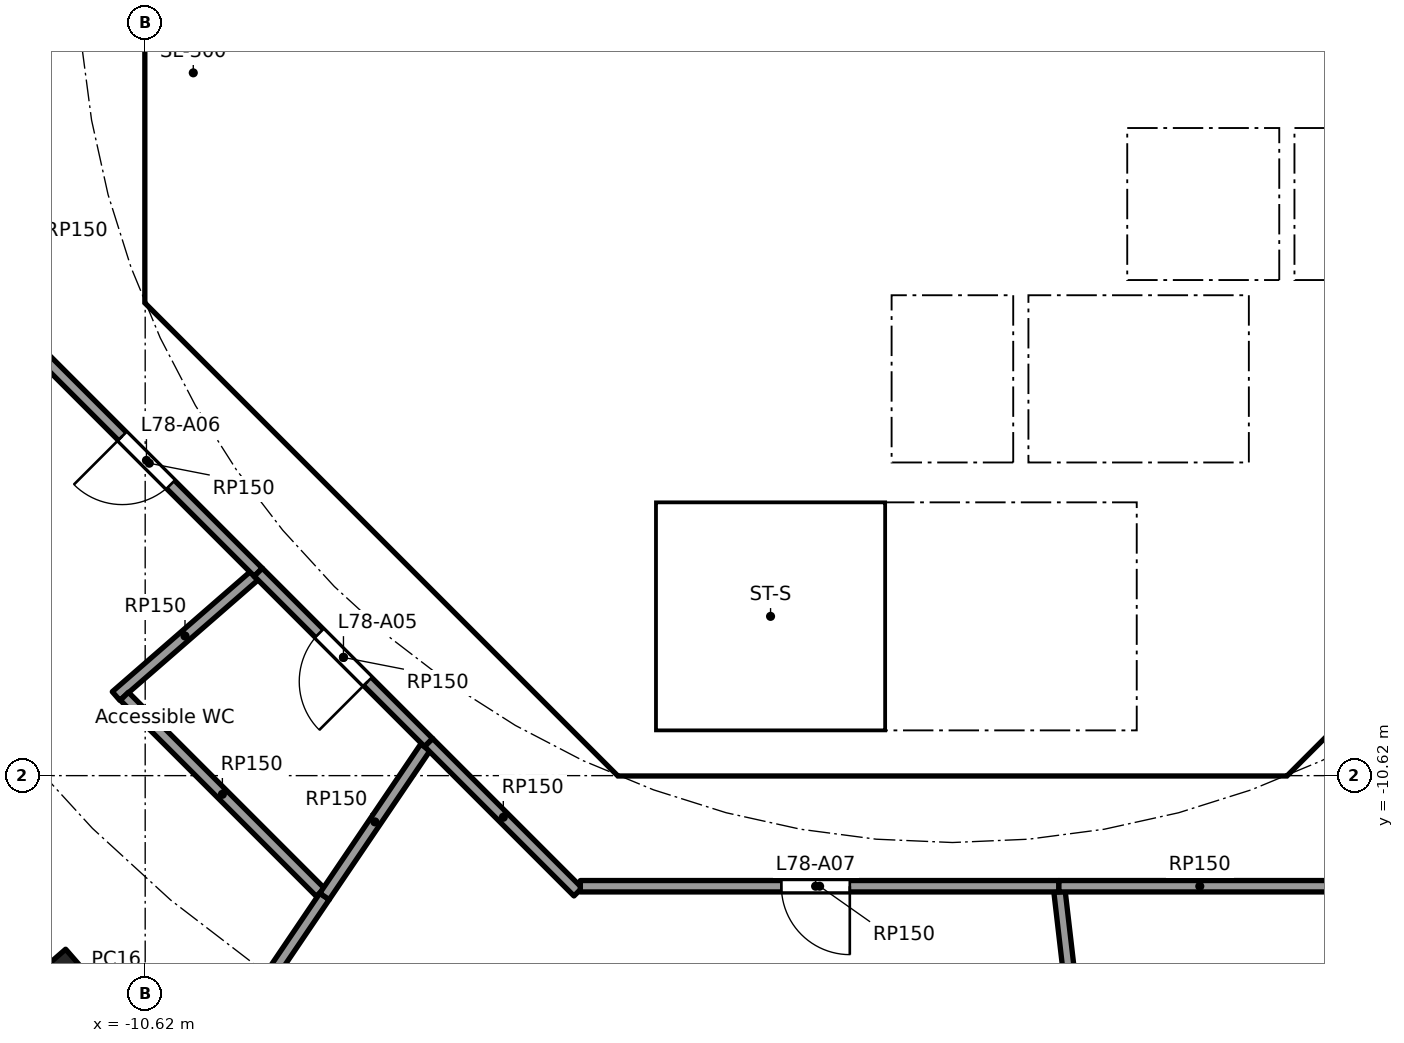
"""IFC4 building model, lengths in metres.
Left out: names, types, materials, properties, quantities, classifications, styles, units other than length and angle.
Written with IfcOpenShell. Run it as: python <this file> out.ifc"""

import sys

from ifc_helpers import new_model, si_unit, direction, frame, frame_2d, origin, origin_2d, place, context, subcontext, project, spatial, polyline, rectangle, hollow_rectangle, outline, extrude, element, fill, save


model = new_model("IFC4")
c1 = context("Model", 3, precision=1e-05, world=origin(), true_north=direction((0.0, 1.0)))
c2 = subcontext(c1, "Body", "Model", "MODEL_VIEW")
j1 = project(units=[si_unit("LENGTHUNIT", "METRE"), si_unit("PLANEANGLEUNIT", "RADIAN")], contexts=[c1])
p1 = place(None, origin())
s1 = spatial("IfcSite", under=j1, at=p1, CompositionType="ELEMENT")
p2 = place(p1, origin())
s2 = spatial("IfcBuilding", under=s1, at=p2, CompositionType="ELEMENT")
p3 = place(p2, frame((0.0, 0.0, 315.9)))
s3 = spatial("IfcBuildingStorey", under=s2, at=p3, CompositionType="ELEMENT", Elevation=315.9)
p4 = place(p3, frame((-11.667, -13.435, -0.3), z_axis=(0.0, 0.0, 1.0), x_axis=(0.657135200433, -0.753772729907, 0.0)))
e1 = element("IfcColumn", 1, at=p4, inside=s3, PredefinedType="COLUMN", context=c2, shape_type="SweptSolid", body=[
    extrude(hollow_rectangle(XDim=0.8, YDim=0.7, WallThickness=0.025, at=origin_2d()), origin(), (0.0, 0.0, 1.0), 4.8),
])
p5 = place(p3, frame((-10.325, 3.801, 0.0), z_axis=(0.0, 0.0, 1.0), x_axis=(0.0, -1.0, 0.0)))
e2 = element("IfcWall", 2, at=p5, inside=s3, PredefinedType="SHEAR", context=c2, shape_type="SweptSolid", body=[
    extrude(rectangle(XDim=7.602, YDim=0.6, at=frame_2d((3.801, 0.0))), origin(), (0.0, 0.0, 1.0), 4.2),
])
p6 = place(p5, frame((0.651, 0.0, 0.0)))
e3 = element("IfcOpeningElement", 3, at=p6, cuts=e2, PredefinedType="OPENING", context=c2, shape_type="SweptSolid", body=[
    extrude(rectangle(XDim=1.5, YDim=2.1, at=frame_2d((0.75, 1.05))), frame((0.0, 0.31, 0.0), z_axis=(0.0, -1.0, 0.0), x_axis=(1.0, 0.0, 0.0)), (0.0, 0.0, 1.0), 0.62),
])
p7 = place(p5, frame((5.451, 0.0, 0.0)))
e4 = element("IfcOpeningElement", 4, at=p7, cuts=e2, PredefinedType="OPENING", context=c2, shape_type="SweptSolid", body=[
    extrude(rectangle(XDim=1.5, YDim=2.1, at=frame_2d((0.75, 1.05))), frame((0.0, 0.31, 0.0), z_axis=(0.0, -1.0, 0.0), x_axis=(1.0, 0.0, 0.0)), (0.0, 0.0, 1.0), 0.62),
])
p8 = place(p3, frame((-9.988, -4.613, 0.0), z_axis=(0.0, 0.0, 1.0), x_axis=(0.707106781187, -0.707106781187, 0.0)))
e5 = element("IfcWall", 5, at=p8, inside=s3, PredefinedType="SHEAR", context=c2, shape_type="SweptSolid", body=[
    extrude(rectangle(XDim=7.602, YDim=0.6, at=frame_2d((3.801, 0.0))), origin(), (0.0, 0.0, 1.0), 4.2),
])
p9 = place(p8, frame((6.151, 0.0, 0.0)))
e6 = element("IfcOpeningElement", 6, at=p9, cuts=e5, PredefinedType="OPENING", context=c2, shape_type="SweptSolid", body=[
    extrude(rectangle(XDim=1.1, YDim=2.1, at=frame_2d((0.55, 1.05))), frame((0.0, 0.31, 0.0), z_axis=(0.0, -1.0, 0.0), x_axis=(1.0, 0.0, 0.0)), (0.0, 0.0, 1.0), 0.62),
])
p10 = place(p3, frame((4.613, -9.988, 0.0), z_axis=(0.0, 0.0, 1.0), x_axis=(0.707106781187, 0.707106781187, 0.0)))
e7 = element("IfcWall", 7, at=p10, inside=s3, PredefinedType="SHEAR", context=c2, shape_type="SweptSolid", body=[
    extrude(rectangle(XDim=7.602, YDim=0.6, at=frame_2d((3.801, 0.0))), origin(), (0.0, 0.0, 1.0), 4.2),
])
p11 = place(p10, frame((3.201, 0.0, 0.0)))
e8 = element("IfcOpeningElement", 8, at=p11, cuts=e7, PredefinedType="OPENING", context=c2, shape_type="SweptSolid", body=[
    extrude(rectangle(XDim=1.2, YDim=2.1, at=frame_2d((0.6, 1.05))), frame((0.0, 0.31, 0.0), z_axis=(0.0, -1.0, 0.0), x_axis=(1.0, 0.0, 0.0)), (0.0, 0.0, 1.0), 0.62),
])
p12 = place(p3, frame((4.0, -10.025, 0.0), z_axis=(0.0, 0.0, 1.0), x_axis=(0.0, 1.0, 0.0)))
e9 = element("IfcWall", 9, at=p12, inside=s3, PredefinedType="SOLIDWALL", context=c2, shape_type="SweptSolid", body=[
    extrude(rectangle(XDim=3.0, YDim=0.2, at=frame_2d((1.5, 0.0))), origin(), (0.0, 0.0, 1.0), 4.2),
])
p13 = place(p12, frame((0.975, 0.0, 0.0)))
e10 = element("IfcOpeningElement", 10, at=p13, cuts=e9, PredefinedType="OPENING", context=c2, shape_type="SweptSolid", body=[
    extrude(rectangle(XDim=1.1, YDim=2.1, at=frame_2d((0.55, 1.05))), frame((0.0, 0.11, 0.0), z_axis=(0.0, -1.0, 0.0), x_axis=(1.0, 0.0, 0.0)), (0.0, 0.0, 1.0), 0.22),
])
p14 = place(p3, frame((-7.0, -7.027, 0.0), z_axis=(0.0, 0.0, 1.0), x_axis=(0.0, 1.0, 0.0)))
e11 = element("IfcWall", 11, at=p14, inside=s3, PredefinedType="PARTITIONING", context=c2, shape_type="SweptSolid", body=[
    extrude(rectangle(XDim=2.927, YDim=0.15, at=frame_2d((1.463, 0.0))), origin(), (0.0, 0.0, 1.0), 4.2),
])
p15 = place(p14, frame((0.976, 0.0, 0.0)))
e12 = element("IfcOpeningElement", 12, at=p15, cuts=e11, PredefinedType="OPENING", context=c2, shape_type="SweptSolid", body=[
    extrude(rectangle(XDim=0.9, YDim=2.1, at=frame_2d((0.45, 1.05))), frame((0.0, 0.085, 0.0), z_axis=(0.0, -1.0, 0.0), x_axis=(1.0, 0.0, 0.0)), (0.0, 0.0, 1.0), 0.17),
])
p16 = place(p3, frame((4.0, -6.5, 0.0), z_axis=(0.0, 0.0, 1.0), x_axis=(0.0, 1.0, 0.0)))
e13 = element("IfcWall", 13, at=p16, inside=s3, PredefinedType="SOLIDWALL", context=c2, shape_type="SweptSolid", body=[
    extrude(rectangle(XDim=2.2, YDim=0.2, at=frame_2d((1.1, 0.0))), origin(), (0.0, 0.0, 1.0), 4.2),
])
p17 = place(p16, frame((0.55, 0.0, 0.0)))
e14 = element("IfcOpeningElement", 14, at=p17, cuts=e13, PredefinedType="OPENING", context=c2, shape_type="SweptSolid", body=[
    extrude(rectangle(XDim=1.1, YDim=2.1, at=frame_2d((0.55, 1.05))), frame((0.0, 0.11, 0.0), z_axis=(0.0, -1.0, 0.0), x_axis=(1.0, 0.0, 0.0)), (0.0, 0.0, 1.0), 0.22),
])
p18 = place(p3, frame((-4.0, -6.5, 0.0), z_axis=(0.0, 0.0, 1.0), x_axis=(0.0, 1.0, 0.0)))
e15 = element("IfcWall", 15, at=p18, inside=s3, PredefinedType="SOLIDWALL", context=c2, shape_type="SweptSolid", body=[
    extrude(rectangle(XDim=2.2, YDim=0.2, at=frame_2d((1.1, 0.0))), origin(), (0.0, 0.0, 1.0), 4.2),
])
p19 = place(p18, frame((0.65, 0.0, 0.0)))
e16 = element("IfcOpeningElement", 16, at=p19, cuts=e15, PredefinedType="OPENING", context=c2, shape_type="SweptSolid", body=[
    extrude(rectangle(XDim=0.9, YDim=2.1, at=frame_2d((0.45, 1.05))), frame((0.0, 0.11, 0.0), z_axis=(0.0, -1.0, 0.0), x_axis=(1.0, 0.0, 0.0)), (0.0, 0.0, 1.0), 0.22),
])
p20 = place(p3, frame((-6.7, -2.0, 0.0), z_axis=(0.0, 0.0, 1.0), x_axis=(1.0, 0.0, 0.0)))
e17 = element("IfcWall", 17, at=p20, inside=s3, PredefinedType="SOLIDWALL", context=c2, shape_type="SweptSolid", body=[
    extrude(rectangle(XDim=13.4, YDim=0.2, at=frame_2d((6.7, 0.0))), origin(), (0.0, 0.0, 1.0), 4.2),
])
p21 = place(p20, frame((9.45, 0.0, 0.0)))
e18 = element("IfcOpeningElement", 18, at=p21, cuts=e17, PredefinedType="OPENING", context=c2, shape_type="SweptSolid", body=[
    extrude(rectangle(XDim=1.1, YDim=2.1, at=frame_2d((0.55, 1.05))), frame((0.0, 0.11, 0.0), z_axis=(0.0, -1.0, 0.0), x_axis=(1.0, 0.0, 0.0)), (0.0, 0.0, 1.0), 0.22),
])
p22 = place(p20, frame((11.65, 0.0, 0.0)))
e19 = element("IfcOpeningElement", 19, at=p22, cuts=e17, PredefinedType="OPENING", context=c2, shape_type="SweptSolid", body=[
    extrude(rectangle(XDim=1.1, YDim=2.1, at=frame_2d((0.55, 1.05))), frame((0.0, 0.11, 0.0), z_axis=(0.0, -1.0, 0.0), x_axis=(1.0, 0.0, 0.0)), (0.0, 0.0, 1.0), 0.22),
])
p23 = place(p20, frame((1.85, 0.0, 0.0)))
e20 = element("IfcOpeningElement", 20, at=p23, cuts=e17, PredefinedType="OPENING", context=c2, shape_type="SweptSolid", body=[
    extrude(rectangle(XDim=0.9, YDim=2.1, at=frame_2d((0.45, 1.05))), frame((0.0, 0.11, 0.0), z_axis=(0.0, -1.0, 0.0), x_axis=(1.0, 0.0, 0.0)), (0.0, 0.0, 1.0), 0.22),
])
p24 = place(p20, frame((6.25, 0.0, 0.0)))
e21 = element("IfcOpeningElement", 21, at=p24, cuts=e17, PredefinedType="OPENING", context=c2, shape_type="SweptSolid", body=[
    extrude(rectangle(XDim=0.9, YDim=2.1, at=frame_2d((0.45, 1.05))), frame((0.0, 0.11, 0.0), z_axis=(0.0, -1.0, 0.0), x_axis=(1.0, 0.0, 0.0)), (0.0, 0.0, 1.0), 0.22),
])
p25 = place(p3, origin())
e22 = element("IfcWall", 22, at=p25, inside=s3, PredefinedType="SHEAR", context=c2, shape_type="SweptSolid", body=[
    extrude(outline(polyline([(-10.625, -3.801), (-10.025, -3.801), (-10.025, -4.152), (-9.776, -4.401), (-10.2, -4.825), (-10.625, -4.401), (-10.625, -3.801)])), origin(), (0.0, 0.0, 1.0), 4.2),
])
p26 = place(p3, origin())
e23 = element("IfcWall", 23, at=p26, inside=s3, PredefinedType="SHEAR", context=c2, shape_type="SweptSolid", body=[
    extrude(outline(polyline([(-4.152, -10.025), (4.152, -10.025), (4.401, -9.776), (4.825, -10.2), (4.401, -10.625), (-4.401, -10.625), (-4.825, -10.2), (-4.401, -9.776), (-4.152, -10.025)])), origin(), (0.0, 0.0, 1.0), 4.2),
])
for number, where, z_axis, x_axis in (
    (24, (-0.9, -6.5, 0.0), (0.0, 0.0, 1.0), (0.0, 1.0, 0.0)),
    (25, (0.9, -6.5, 0.0), (0.0, 0.0, 1.0), (0.0, 1.0, 0.0)),
):
    element("IfcWall", number, at=place(p3, frame(where, z_axis=z_axis, x_axis=x_axis)), inside=s3, PredefinedType="SOLIDWALL", context=c2, shape_type="SweptSolid", body=[
        extrude(rectangle(XDim=2.2, YDim=0.2, at=frame_2d((1.1, 0.0))), origin(), (0.0, 0.0, 1.0), 4.2),
    ])
p27 = place(p3, origin())
e26 = element("IfcWall", 26, at=p27, inside=s3, PredefinedType="SOLIDWALL", context=c2, shape_type="SweptSolid", body=[
    extrude(outline(polyline([(-6.7, -2.1), (-6.5, -2.1), (-6.5, -4.1), (-2.3, -4.1), (-2.3, -2.1), (-2.1, -2.1), (-2.1, -4.1), (2.1, -4.1), (2.1, -2.1), (2.3, -2.1), (2.3, -4.1), (4.3, -4.1), (4.3, -2.1), (4.5, -2.1), (4.5, -4.1), (6.5, -4.1), (6.5, -2.1), (6.7, -2.1), (6.7, -4.3), (-6.7, -4.3), (-6.7, -2.1)])), origin(), (0.0, 0.0, 1.0), 4.2),
])
p28 = place(p3, frame((-10.025, -4.0, 0.0), z_axis=(0.0, 0.0, 1.0), x_axis=(1.0, 0.0, 0.0)))
e27 = element("IfcWall", 27, at=p28, inside=s3, PredefinedType="PARTITIONING", context=c2, shape_type="SweptSolid", body=[
    extrude(rectangle(XDim=3.325, YDim=0.2, at=frame_2d((1.662, 0.0))), origin(), (0.0, 0.0, 1.0), 4.2),
])
p29 = place(p3, origin())
e28 = element("IfcWall", 28, at=p29, inside=s3, PredefinedType="SOLIDWALL", context=c2, shape_type="SweptSolid", body=[
    extrude(outline(polyline([(-3.9, -10.025), (-4.1, -10.025), (-4.1, -7.025), (-3.9, -7.025), (-3.9, -10.025)])), origin(), (0.0, 0.0, 1.0), 4.2),
])
p30 = place(p3, origin())
e29 = element("IfcWall", 29, at=p30, inside=s3, PredefinedType="SOLIDWALL", context=c2, shape_type="SweptSolid", body=[
    extrude(outline(polyline([(4.1, -7.025), (-4.1, -7.025), (-4.1, -6.5), (4.1, -6.5), (4.1, -7.025)])), origin(), (0.0, 0.0, 1.0), 4.2),
])
p31 = place(p3, frame((-11.004, -9.572, 0.0), z_axis=(0.0, 0.0, 1.0), x_axis=(0.754472226649, 0.65633197333, 0.0)))
e30 = element("IfcWall", 30, at=p31, inside=s3, PredefinedType="PARTITIONING", context=c2, shape_type="SweptSolid", body=[
    extrude(rectangle(XDim=2.406, YDim=0.15, at=frame_2d((1.203, 0.0))), origin(), (0.0, 0.0, 1.0), 4.2),
])
p32 = place(p3, frame((-9.132, -7.944, 0.0), z_axis=(0.0, 0.0, 1.0), x_axis=(-0.707076684492, 0.7071368766, 0.0)))
e31 = element("IfcWall", 31, at=p32, inside=s3, PredefinedType="PARTITIONING", context=c2, shape_type="SweptSolid", body=[
    extrude(rectangle(XDim=4.056, YDim=0.15, at=frame_2d((2.028, 0.0))), origin(), (0.0, 0.0, 1.0), 4.2),
])
p33 = place(p32, frame((1.631, 0.0, 0.0)))
e32 = element("IfcOpeningElement", 32, at=p33, cuts=e31, PredefinedType="OPENING", context=c2, shape_type="SweptSolid", body=[
    extrude(rectangle(XDim=0.9, YDim=2.1, at=frame_2d((0.45, 1.05))), frame((0.0, 0.085, 0.0), z_axis=(0.0, -1.0, 0.0), x_axis=(1.0, 0.0, 0.0)), (0.0, 0.0, 1.0), 0.17),
])
p34 = place(p3, frame((-8.315, -12.155, 0.0), z_axis=(0.0, 0.0, 1.0), x_axis=(-0.707106781187, 0.707106781187, 0.0)))
e33 = element("IfcWall", 33, at=p34, inside=s3, PredefinedType="PARTITIONING", context=c2, shape_type="SweptSolid", body=[
    extrude(rectangle(XDim=3.647, YDim=0.15, at=frame_2d((1.823, 0.0))), origin(), (0.0, 0.0, 1.0), 4.2),
])
p35 = place(p3, frame((-8.261, -12.209, 0.0), z_axis=(0.0, 0.0, 1.0), x_axis=(-0.560426361266, -0.82820425838, 0.0)))
e34 = element("IfcWall", 34, at=p35, inside=s3, PredefinedType="PARTITIONING", context=c2, shape_type="SweptSolid", body=[
    extrude(rectangle(XDim=5.095, YDim=0.15, at=frame_2d((2.547, 0.0))), origin(), (0.0, 0.0, 1.0), 4.2),
])
p36 = place(p3, frame((-6.891, -10.185, 0.0), z_axis=(0.0, 0.0, 1.0), x_axis=(-0.707106781187, 0.707106781187, 0.0)))
e35 = element("IfcWall", 35, at=p36, inside=s3, PredefinedType="PARTITIONING", context=c2, shape_type="SweptSolid", body=[
    extrude(rectangle(XDim=3.169, YDim=0.15, at=frame_2d((1.584, 0.0))), origin(), (0.0, 0.0, 1.0), 4.2),
])
p37 = place(p36, frame((1.135, 0.0, 0.0)))
e36 = element("IfcOpeningElement", 36, at=p37, cuts=e35, PredefinedType="OPENING", context=c2, shape_type="SweptSolid", body=[
    extrude(rectangle(XDim=0.9, YDim=2.1, at=frame_2d((0.45, 1.05))), frame((0.0, 0.085, 0.0), z_axis=(0.0, -1.0, 0.0), x_axis=(1.0, 0.0, 0.0)), (0.0, 0.0, 1.0), 0.17),
])
p38 = place(p3, frame((-6.934, -10.248, 0.0), z_axis=(0.0, 0.0, 1.0), x_axis=(-0.560540301995, -0.828127145938, 0.0)))
e37 = element("IfcWall", 37, at=p38, inside=s3, PredefinedType="PARTITIONING", context=c2, shape_type="SweptSolid", body=[
    extrude(rectangle(XDim=2.368, YDim=0.15, at=frame_2d((1.184, 0.0))), origin(), (0.0, 0.0, 1.0), 4.2),
])
p39 = place(p3, frame((-4.926, -12.15, 0.0), z_axis=(0.0, 0.0, 1.0), x_axis=(-0.707150707683, 0.707062851961, 0.0)))
e38 = element("IfcWall", 38, at=p39, inside=s3, PredefinedType="PARTITIONING", context=c2, shape_type="SweptSolid", body=[
    extrude(rectangle(XDim=2.779, YDim=0.15, at=frame_2d((1.389, 0.0))), origin(), (0.0, 0.0, 1.0), 4.2),
])
p40 = place(p3, frame((1.401, -12.075, 0.0), z_axis=(0.0, 0.0, 1.0), x_axis=(-1.0, 0.0, 0.0)))
e39 = element("IfcWall", 39, at=p40, inside=s3, PredefinedType="PARTITIONING", context=c2, shape_type="SweptSolid", body=[
    extrude(rectangle(XDim=6.296, YDim=0.15, at=frame_2d((3.148, 0.0))), origin(), (0.0, 0.0, 1.0), 4.2),
])
p41 = place(p40, frame((2.751, 0.0, 0.0)))
e40 = element("IfcOpeningElement", 40, at=p41, cuts=e39, PredefinedType="OPENING", context=c2, shape_type="SweptSolid", body=[
    extrude(rectangle(XDim=0.9, YDim=2.1, at=frame_2d((0.45, 1.05))), frame((0.0, 0.085, 0.0), z_axis=(0.0, -1.0, 0.0), x_axis=(1.0, 0.0, 0.0)), (0.0, 0.0, 1.0), 0.17),
])
p42 = place(p3, frame((1.41, -12.15, 0.0), z_axis=(0.0, 0.0, 1.0), x_axis=(0.115263493726, -0.993334952075, 0.0)))
e41 = element("IfcWall", 41, at=p42, inside=s3, PredefinedType="PARTITIONING", context=c2, shape_type="SweptSolid", body=[
    extrude(rectangle(XDim=8.449, YDim=0.15, at=frame_2d((4.225, 0.0))), origin(), (0.0, 0.0, 1.0), 4.2),
])
p43 = place(p3, frame((5.108, -12.075, 0.0), z_axis=(0.0, 0.0, 1.0), x_axis=(-1.0, 0.0, 0.0)))
e42 = element("IfcWall", 42, at=p43, inside=s3, PredefinedType="PARTITIONING", context=c2, shape_type="SweptSolid", body=[
    extrude(rectangle(XDim=3.707, YDim=0.15, at=frame_2d((1.854, 0.0))), origin(), (0.0, 0.0, 1.0), 4.2),
])
p44 = place(p21, origin())
e43 = element("IfcDoor", 43, at=p44, inside=s3, OperationType="DOUBLE_DOOR_SLIDING", PredefinedType="DOOR", context=c2, shape_type="SweptSolid", body=[
    extrude(rectangle(XDim=1.1, YDim=2.1, at=frame_2d((0.55, 1.05))), frame((0.0, 0.025, 0.0), z_axis=(0.0, -1.0, 0.0), x_axis=(1.0, 0.0, 0.0)), (0.0, 0.0, 1.0), 0.05),
])
fill(e18, e43)
p45 = place(p17, origin())
e44 = element("IfcDoor", 44, at=p45, inside=s3, OperationType="DOUBLE_DOOR_SLIDING", PredefinedType="DOOR", context=c2, shape_type="SweptSolid", body=[
    extrude(rectangle(XDim=1.1, YDim=2.1, at=frame_2d((0.55, 1.05))), frame((0.0, 0.025, 0.0), z_axis=(0.0, -1.0, 0.0), x_axis=(1.0, 0.0, 0.0)), (0.0, 0.0, 1.0), 0.05),
])
fill(e14, e44)
p46 = place(p13, origin())
e45 = element("IfcDoor", 45, at=p46, inside=s3, OperationType="SINGLE_SWING_LEFT", PredefinedType="DOOR", context=c2, shape_type="SweptSolid", body=[
    extrude(rectangle(XDim=1.1, YDim=2.1, at=frame_2d((0.55, 1.05))), frame((0.0, 0.025, 0.0), z_axis=(0.0, -1.0, 0.0), x_axis=(1.0, 0.0, 0.0)), (0.0, 0.0, 1.0), 0.05),
])
fill(e10, e45)
p47 = place(p15, origin())
e46 = element("IfcDoor", 46, at=p47, inside=s3, OperationType="SINGLE_SWING_LEFT", PredefinedType="DOOR", context=c2, shape_type="SweptSolid", body=[
    extrude(rectangle(XDim=0.9, YDim=2.1, at=frame_2d((0.45, 1.05))), frame((0.0, 0.025, 0.0), z_axis=(0.0, -1.0, 0.0), x_axis=(1.0, 0.0, 0.0)), (0.0, 0.0, 1.0), 0.05),
])
fill(e12, e46)
p48 = place(p19, frame((0.9, 0.0, 0.0), x_axis=(-1.0, 0.0, 0.0)))
e47 = element("IfcDoor", 47, at=p48, inside=s3, OperationType="SINGLE_SWING_LEFT", PredefinedType="DOOR", context=c2, shape_type="SweptSolid", body=[
    extrude(rectangle(XDim=0.9, YDim=2.1, at=frame_2d((0.45, 1.05))), frame((0.0, 0.025, 0.0), z_axis=(0.0, -1.0, 0.0), x_axis=(1.0, 0.0, 0.0)), (0.0, 0.0, 1.0), 0.05),
])
fill(e16, e47)
p49 = place(p23, frame((0.9, 0.0, 0.0), x_axis=(-1.0, 0.0, 0.0)))
e48 = element("IfcDoor", 48, at=p49, inside=s3, OperationType="SINGLE_SWING_LEFT", PredefinedType="DOOR", context=c2, shape_type="SweptSolid", body=[
    extrude(rectangle(XDim=0.9, YDim=2.1, at=frame_2d((0.45, 1.05))), frame((0.0, 0.025, 0.0), z_axis=(0.0, -1.0, 0.0), x_axis=(1.0, 0.0, 0.0)), (0.0, 0.0, 1.0), 0.05),
])
fill(e20, e48)
p50 = place(p24, frame((0.9, 0.0, 0.0), x_axis=(-1.0, 0.0, 0.0)))
e49 = element("IfcDoor", 49, at=p50, inside=s3, OperationType="SINGLE_SWING_LEFT", PredefinedType="DOOR", context=c2, shape_type="SweptSolid", body=[
    extrude(rectangle(XDim=0.9, YDim=2.1, at=frame_2d((0.45, 1.05))), frame((0.0, 0.025, 0.0), z_axis=(0.0, -1.0, 0.0), x_axis=(1.0, 0.0, 0.0)), (0.0, 0.0, 1.0), 0.05),
])
fill(e21, e49)
p51 = place(p7, origin())
e50 = element("IfcDoor", 50, at=p51, inside=s3, OperationType="DOUBLE_DOOR_SINGLE_SWING", PredefinedType="DOOR", context=c2, shape_type="SweptSolid", body=[
    extrude(rectangle(XDim=1.5, YDim=2.1, at=frame_2d((0.75, 1.05))), frame((0.0, 0.025, 0.0), z_axis=(0.0, -1.0, 0.0), x_axis=(1.0, 0.0, 0.0)), (0.0, 0.0, 1.0), 0.05),
])
fill(e4, e50)
p52 = place(p9, origin())
e51 = element("IfcDoor", 51, at=p52, inside=s3, OperationType="SINGLE_SWING_LEFT", PredefinedType="DOOR", context=c2, shape_type="SweptSolid", body=[
    extrude(rectangle(XDim=1.1, YDim=2.1, at=frame_2d((0.55, 1.05))), frame((0.0, 0.025, 0.0), z_axis=(0.0, -1.0, 0.0), x_axis=(1.0, 0.0, 0.0)), (0.0, 0.0, 1.0), 0.05),
])
fill(e6, e51)
p53 = place(p37, origin())
e52 = element("IfcDoor", 52, at=p53, inside=s3, OperationType="SINGLE_SWING_LEFT", PredefinedType="DOOR", context=c2, shape_type="SweptSolid", body=[
    extrude(rectangle(XDim=0.9, YDim=2.1, at=frame_2d((0.45, 1.05))), frame((0.0, 0.025, 0.0), z_axis=(0.0, -1.0, 0.0), x_axis=(1.0, 0.0, 0.0)), (0.0, 0.0, 1.0), 0.05),
])
fill(e36, e52)
p54 = place(p33, origin())
e53 = element("IfcDoor", 53, at=p54, inside=s3, OperationType="SINGLE_SWING_RIGHT", PredefinedType="DOOR", context=c2, shape_type="SweptSolid", body=[
    extrude(rectangle(XDim=0.9, YDim=2.1, at=frame_2d((0.45, 1.05))), frame((0.0, 0.025, 0.0), z_axis=(0.0, -1.0, 0.0), x_axis=(1.0, 0.0, 0.0)), (0.0, 0.0, 1.0), 0.05),
])
fill(e32, e53)
p55 = place(p41, origin())
e54 = element("IfcDoor", 54, at=p55, inside=s3, OperationType="SINGLE_SWING_LEFT", PredefinedType="DOOR", context=c2, shape_type="SweptSolid", body=[
    extrude(rectangle(XDim=0.9, YDim=2.1, at=frame_2d((0.45, 1.05))), frame((0.0, 0.025, 0.0), z_axis=(0.0, -1.0, 0.0), x_axis=(1.0, 0.0, 0.0)), (0.0, 0.0, 1.0), 0.05),
])
fill(e40, e54)
save(model, sys.argv[1])
